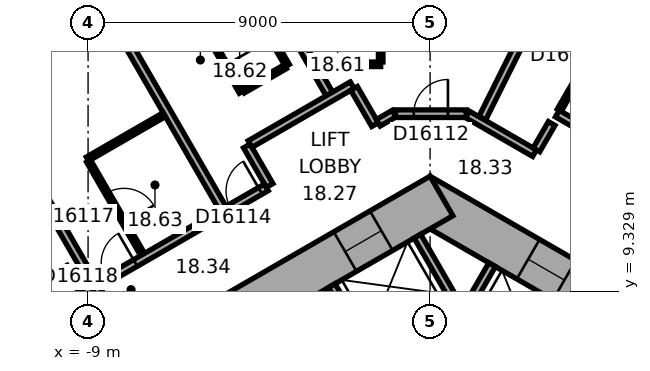
"""IFC4 building model, lengths in metres.
Left out: names, types, materials, properties, quantities, classifications, styles, units other than length and angle.
Written with IfcOpenShell. Run it as: python <this file> out.ifc"""

import sys

from ifc_helpers import new_model, si_unit, direction, frame, frame_2d, origin, place, context, subcontext, project, spatial, rectangle, extrude, element, fill, save


model = new_model("IFC4")
c1 = context("Model", 3, precision=1e-05, world=origin(), true_north=direction((0.0, 1.0)))
c2 = subcontext(c1, "Body", "Model", "MODEL_VIEW")
j1 = project(units=[si_unit("LENGTHUNIT", "METRE"), si_unit("PLANEANGLEUNIT", "RADIAN")], contexts=[c1])
p1 = place(None, origin())
s1 = spatial("IfcSite", under=j1, at=p1, CompositionType="ELEMENT")
p2 = place(p1, origin())
s2 = spatial("IfcBuilding", under=s1, at=p2, CompositionType="ELEMENT")
p3 = place(p2, frame((0.0, 0.0, 83.6)))
s3 = spatial("IfcBuildingStorey", under=s2, at=p3, CompositionType="ELEMENT", Elevation=83.6)
p4 = place(p3, frame((10.4, 5.658, 0.0), z_axis=(0.0, 0.0, 1.0), x_axis=(-0.866021384402, 0.500006961711, 0.0)))
e1 = element("IfcWall", 1, at=p4, inside=s3, PredefinedType="SHEAR", context=c2, shape_type="SweptSolid", body=[
    extrude(rectangle(XDim=12.355, YDim=1.2, at=frame_2d((6.178, 0.0))), origin(), (0.0, 0.0, 1.0), 3.3),
])
p5 = place(p4, frame((2.728, 0.0, 0.0)))
e2 = element("IfcOpeningElement", 2, at=p5, cuts=e1, PredefinedType="OPENING", context=c2, shape_type="SweptSolid", body=[
    extrude(rectangle(XDim=1.1, YDim=2.1, at=frame_2d((0.55, 1.05))), frame((0.0, 0.61, 0.0), z_axis=(0.0, -1.0, 0.0), x_axis=(1.0, 0.0, 0.0)), (0.0, 0.0, 1.0), 1.22),
])
p6 = place(p4, frame((5.328, 0.0, 0.0)))
e3 = element("IfcOpeningElement", 3, at=p6, cuts=e1, PredefinedType="OPENING", context=c2, shape_type="SweptSolid", body=[
    extrude(rectangle(XDim=1.1, YDim=2.1, at=frame_2d((0.55, 1.05))), frame((0.0, 0.61, 0.0), z_axis=(0.0, -1.0, 0.0), x_axis=(1.0, 0.0, 0.0)), (0.0, 0.0, 1.0), 1.22),
])
p7 = place(p4, frame((7.928, 0.0, 0.0)))
e4 = element("IfcOpeningElement", 4, at=p7, cuts=e1, PredefinedType="OPENING", context=c2, shape_type="SweptSolid", body=[
    extrude(rectangle(XDim=1.1, YDim=2.1, at=frame_2d((0.55, 1.05))), frame((0.0, 0.61, 0.0), z_axis=(0.0, -1.0, 0.0), x_axis=(1.0, 0.0, 0.0)), (0.0, 0.0, 1.0), 1.22),
])
p8 = place(p3, frame((0.3, 11.836, 0.0), z_axis=(0.0, 0.0, 1.0), x_axis=(-0.866021384402, -0.500006961711, 0.0)))
e5 = element("IfcWall", 5, at=p8, inside=s3, PredefinedType="SHEAR", context=c2, shape_type="SweptSolid", body=[
    extrude(rectangle(XDim=12.355, YDim=1.2, at=frame_2d((6.178, 0.0))), origin(), (0.0, 0.0, 1.0), 3.3),
])
p9 = place(p8, frame((6.378, 0.0, 0.0)))
e6 = element("IfcOpeningElement", 6, at=p9, cuts=e5, PredefinedType="OPENING", context=c2, shape_type="SweptSolid", body=[
    extrude(rectangle(XDim=1.5, YDim=2.1, at=frame_2d((0.75, 1.05))), frame((0.0, 0.61, 0.0), z_axis=(0.0, -1.0, 0.0), x_axis=(1.0, 0.0, 0.0)), (0.0, 0.0, 1.0), 1.22),
])
p10 = place(p8, frame((1.828, 0.0, 0.0)))
e7 = element("IfcOpeningElement", 7, at=p10, cuts=e5, PredefinedType="OPENING", context=c2, shape_type="SweptSolid", body=[
    extrude(rectangle(XDim=1.1, YDim=2.1, at=frame_2d((0.55, 1.05))), frame((0.0, 0.61, 0.0), z_axis=(0.0, -1.0, 0.0), x_axis=(1.0, 0.0, 0.0)), (0.0, 0.0, 1.0), 1.22),
])
p11 = place(p3, frame((20.63, 15.47, 0.0), z_axis=(0.0, 0.0, 1.0), x_axis=(-0.894934518609, 0.446197498203, 0.0)))
e8 = element("IfcWall", 8, at=p11, inside=s3, PredefinedType="STANDARD", context=c2, shape_type="SweptSolid", body=[
    extrude(rectangle(XDim=21.246, YDim=0.2, at=frame_2d((10.623, 0.0))), origin(), (0.0, 0.0, 1.0), 3.3),
])
p12 = place(p11, frame((1.553, 0.0, 0.8)))
e9 = element("IfcOpeningElement", 9, at=p12, cuts=e8, PredefinedType="OPENING", context=c2, shape_type="SweptSolid", body=[
    extrude(rectangle(XDim=2.4, YDim=1.7, at=frame_2d((1.2, 0.85))), frame((0.0, 0.11, 0.0), z_axis=(0.0, -1.0, 0.0), x_axis=(1.0, 0.0, 0.0)), (0.0, 0.0, 1.0), 0.22),
])
p13 = place(p11, frame((5.488, 0.0, 0.8)))
e10 = element("IfcOpeningElement", 10, at=p13, cuts=e8, PredefinedType="OPENING", context=c2, shape_type="SweptSolid", body=[
    extrude(rectangle(XDim=2.4, YDim=1.7, at=frame_2d((1.2, 0.85))), frame((0.0, 0.11, 0.0), z_axis=(0.0, -1.0, 0.0), x_axis=(1.0, 0.0, 0.0)), (0.0, 0.0, 1.0), 0.22),
])
p14 = place(p11, frame((9.422, 0.0, 0.8)))
e11 = element("IfcOpeningElement", 11, at=p14, cuts=e8, PredefinedType="OPENING", context=c2, shape_type="SweptSolid", body=[
    extrude(rectangle(XDim=2.4, YDim=1.7, at=frame_2d((1.2, 0.85))), frame((0.0, 0.11, 0.0), z_axis=(0.0, -1.0, 0.0), x_axis=(1.0, 0.0, 0.0)), (0.0, 0.0, 1.0), 0.22),
])
p15 = place(p11, frame((13.357, 0.0, 0.8)))
e12 = element("IfcOpeningElement", 12, at=p15, cuts=e8, PredefinedType="OPENING", context=c2, shape_type="SweptSolid", body=[
    extrude(rectangle(XDim=2.4, YDim=1.7, at=frame_2d((1.2, 0.85))), frame((0.0, 0.11, 0.0), z_axis=(0.0, -1.0, 0.0), x_axis=(1.0, 0.0, 0.0)), (0.0, 0.0, 1.0), 0.22),
])
p16 = place(p11, frame((17.292, 0.0, 0.8)))
e13 = element("IfcOpeningElement", 13, at=p16, cuts=e8, PredefinedType="OPENING", context=c2, shape_type="SweptSolid", body=[
    extrude(rectangle(XDim=2.4, YDim=1.7, at=frame_2d((1.2, 0.85))), frame((0.0, 0.11, 0.0), z_axis=(0.0, -1.0, 0.0), x_axis=(1.0, 0.0, 0.0)), (0.0, 0.0, 1.0), 0.22),
])
p17 = place(p3, frame((-3.136, 24.805, 0.0), z_axis=(0.0, 0.0, 1.0), x_axis=(-0.866028291626, -0.499994998079, 0.0)))
e14 = element("IfcWall", 14, at=p17, inside=s3, PredefinedType="STANDARD", context=c2, shape_type="SweptSolid", body=[
    extrude(rectangle(XDim=21.246, YDim=0.2, at=frame_2d((10.623, 0.0))), origin(), (0.0, 0.0, 1.0), 3.3),
])
p18 = place(p17, frame((1.555, 0.0, 0.8)))
e15 = element("IfcOpeningElement", 15, at=p18, cuts=e14, PredefinedType="OPENING", context=c2, shape_type="SweptSolid", body=[
    extrude(rectangle(XDim=2.4, YDim=1.7, at=frame_2d((1.2, 0.85))), frame((0.0, 0.11, 0.0), z_axis=(0.0, -1.0, 0.0), x_axis=(1.0, 0.0, 0.0)), (0.0, 0.0, 1.0), 0.22),
])
p19 = place(p17, frame((5.489, 0.0, 0.8)))
e16 = element("IfcOpeningElement", 16, at=p19, cuts=e14, PredefinedType="OPENING", context=c2, shape_type="SweptSolid", body=[
    extrude(rectangle(XDim=2.4, YDim=1.7, at=frame_2d((1.2, 0.85))), frame((0.0, 0.11, 0.0), z_axis=(0.0, -1.0, 0.0), x_axis=(1.0, 0.0, 0.0)), (0.0, 0.0, 1.0), 0.22),
])
p20 = place(p17, frame((9.424, 0.0, 0.8)))
e17 = element("IfcOpeningElement", 17, at=p20, cuts=e14, PredefinedType="OPENING", context=c2, shape_type="SweptSolid", body=[
    extrude(rectangle(XDim=2.4, YDim=1.7, at=frame_2d((1.2, 0.85))), frame((0.0, 0.11, 0.0), z_axis=(0.0, -1.0, 0.0), x_axis=(1.0, 0.0, 0.0)), (0.0, 0.0, 1.0), 0.22),
])
p21 = place(p17, frame((13.358, 0.0, 0.8)))
e18 = element("IfcOpeningElement", 18, at=p21, cuts=e14, PredefinedType="OPENING", context=c2, shape_type="SweptSolid", body=[
    extrude(rectangle(XDim=2.4, YDim=1.7, at=frame_2d((1.2, 0.85))), frame((0.0, 0.11, 0.0), z_axis=(0.0, -1.0, 0.0), x_axis=(1.0, 0.0, 0.0)), (0.0, 0.0, 1.0), 0.22),
])
p22 = place(p17, frame((17.293, 0.0, 0.8)))
e19 = element("IfcOpeningElement", 19, at=p22, cuts=e14, PredefinedType="OPENING", context=c2, shape_type="SweptSolid", body=[
    extrude(rectangle(XDim=2.4, YDim=1.7, at=frame_2d((1.2, 0.85))), frame((0.0, 0.11, 0.0), z_axis=(0.0, -1.0, 0.0), x_axis=(1.0, 0.0, 0.0)), (0.0, 0.0, 1.0), 0.22),
])
p23 = place(p3, frame((0.532, 8.122, 0.0), z_axis=(0.0, 0.0, 1.0), x_axis=(0.500077893725, 0.86598042715, 0.0)))
e20 = element("IfcWall", 20, at=p23, inside=s3, PredefinedType="PARTITIONING", context=c2, shape_type="SweptSolid", body=[
    extrude(rectangle(XDim=2.2, YDim=0.2, at=frame_2d((1.1, 0.0))), origin(), (0.0, 0.0, 1.0), 3.05),
])
p24 = place(p3, frame((0.767, 8.872, 0.0), z_axis=(0.0, 0.0, 1.0), x_axis=(-0.499994660107, 0.866028486751, 0.0)))
e21 = element("IfcWall", 21, at=p24, inside=s3, PredefinedType="PARTITIONING", context=c2, shape_type="SweptSolid", body=[
    extrude(rectangle(XDim=2.2, YDim=0.2, at=frame_2d((1.1, 0.0))), origin(), (0.0, 0.0, 1.0), 3.05),
])
p25 = place(p3, frame((-1.485, 7.572, 0.0), z_axis=(0.0, 0.0, 1.0), x_axis=(-0.50002983664, 0.866008176907, 0.0)))
e22 = element("IfcWall", 22, at=p25, inside=s3, PredefinedType="PARTITIONING", context=c2, shape_type="SweptSolid", body=[
    extrude(rectangle(XDim=2.2, YDim=0.2, at=frame_2d((1.1, 0.0))), origin(), (0.0, 0.0, 1.0), 3.05),
])
p26 = place(p3, frame((-10.083, 19.524, 0.0), z_axis=(0.0, 0.0, 1.0), x_axis=(0.499999662836, -0.866025598446, 0.0)))
e23 = element("IfcWall", 23, at=p26, inside=s3, PredefinedType="PARTITIONING", context=c2, shape_type="SweptSolid", body=[
    extrude(rectangle(XDim=9.25, YDim=0.2, at=frame_2d((4.625, 0.0))), origin(), (0.0, 0.0, 1.0), 2.6),
])
p27 = place(p3, frame((-9.016, 12.808, 0.0), z_axis=(0.0, 0.0, 1.0), x_axis=(0.86600796803, 0.500030198396, 0.0)))
e24 = element("IfcWall", 24, at=p27, inside=s3, PredefinedType="PARTITIONING", context=c2, shape_type="SweptSolid", body=[
    extrude(rectangle(XDim=2.335, YDim=0.12, at=frame_2d((1.167, 0.0))), origin(), (0.0, 0.0, 1.0), 3.05),
])
p28 = place(p3, frame((-8.902, 9.41, 0.0), z_axis=(0.0, 0.0, 1.0), x_axis=(-0.866014299198, -0.500019233215, 0.0)))
e25 = element("IfcWall", 25, at=p28, inside=s3, PredefinedType="PARTITIONING", context=c2, shape_type="SweptSolid", body=[
    extrude(rectangle(XDim=3.133, YDim=0.2, at=frame_2d((1.567, 0.0))), origin(), (0.0, 0.0, 1.0), 3.05),
])
p29 = place(p28, frame((0.225, 0.0, 0.0)))
e26 = element("IfcOpeningElement", 26, at=p29, cuts=e25, PredefinedType="OPENING", context=c2, shape_type="SweptSolid", body=[
    extrude(rectangle(XDim=0.9, YDim=2.1, at=frame_2d((0.45, 1.05))), frame((0.0, 0.11, 0.0), z_axis=(0.0, -1.0, 0.0), x_axis=(1.0, 0.0, 0.0)), (0.0, 0.0, 1.0), 0.22),
])
p30 = place(p3, frame((-7.865, 7.814, 0.0), z_axis=(0.0, 0.0, 1.0), x_axis=(-0.500004234368, 0.866022959057, 0.0)))
e27 = element("IfcWall", 27, at=p30, inside=s3, PredefinedType="PARTITIONING", context=c2, shape_type="SweptSolid", body=[
    extrude(rectangle(XDim=11.25, YDim=0.2, at=frame_2d((5.625, 0.0))), origin(), (0.0, 0.0, 1.0), 3.05),
])
p31 = place(p30, frame((0.5, 0.0, 0.0)))
e28 = element("IfcOpeningElement", 28, at=p31, cuts=e27, PredefinedType="OPENING", context=c2, shape_type="SweptSolid", body=[
    extrude(rectangle(XDim=0.9, YDim=2.1, at=frame_2d((0.45, 1.05))), frame((0.0, 0.11, 0.0), z_axis=(0.0, -1.0, 0.0), x_axis=(1.0, 0.0, 0.0)), (0.0, 0.0, 1.0), 0.22),
])
p32 = place(p3, frame((-7.566, 10.296, 0.0), z_axis=(0.0, 0.0, 1.0), x_axis=(-0.499985389037, 0.866033839264, 0.0)))
e29 = element("IfcWall", 29, at=p32, inside=s3, PredefinedType="PARTITIONING", context=c2, shape_type="SweptSolid", body=[
    extrude(rectangle(XDim=2.84, YDim=0.12, at=frame_2d((1.42, 0.0))), origin(), (0.0, 0.0, 1.0), 3.05),
])
p33 = place(p32, frame((0.97, 0.0, 0.0)))
e30 = element("IfcOpeningElement", 30, at=p33, cuts=e29, PredefinedType="OPENING", context=c2, shape_type="SweptSolid", body=[
    extrude(rectangle(XDim=0.9, YDim=2.1, at=frame_2d((0.45, 1.05))), frame((0.0, 0.07, 0.0), z_axis=(0.0, -1.0, 0.0), x_axis=(1.0, 0.0, 0.0)), (0.0, 0.0, 1.0), 0.14),
])
p34 = place(p3, frame((-6.676, 21.492, 0.0), z_axis=(0.0, 0.0, 1.0), x_axis=(0.500011263043, -0.866018900966, 0.0)))
e31 = element("IfcWall", 31, at=p34, inside=s3, PredefinedType="PARTITIONING", context=c2, shape_type="SweptSolid", body=[
    extrude(rectangle(XDim=8.049, YDim=0.2, at=frame_2d((4.024, 0.0))), origin(), (0.0, 0.0, 1.0), 3.05),
])
p35 = place(p3, frame((-5.026, 17.469, 0.0), z_axis=(0.0, 0.0, 1.0), x_axis=(0.500005339912, -0.866022320763, 0.0)))
e32 = element("IfcWall", 32, at=p35, inside=s3, PredefinedType="PARTITIONING", context=c2, shape_type="SweptSolid", body=[
    extrude(rectangle(XDim=2.54, YDim=0.12, at=frame_2d((1.27, 0.0))), origin(), (0.0, 0.0, 1.0), 3.05),
])
p36 = place(p3, frame((-4.968, 14.569, 0.0), z_axis=(0.0, 0.0, 1.0), x_axis=(-0.500046963369, 0.865998287773, 0.0)))
e33 = element("IfcWall", 33, at=p36, inside=s3, PredefinedType="PARTITIONING", context=c2, shape_type="SweptSolid", body=[
    extrude(rectangle(XDim=2.54, YDim=0.12, at=frame_2d((1.27, 0.0))), origin(), (0.0, 0.0, 1.0), 3.05),
])
p37 = place(p36, frame((0.82, 0.0, 0.0)))
e34 = element("IfcOpeningElement", 34, at=p37, cuts=e33, PredefinedType="OPENING", context=c2, shape_type="SweptSolid", body=[
    extrude(rectangle(XDim=0.9, YDim=2.1, at=frame_2d((0.45, 1.05))), frame((0.0, 0.07, 0.0), z_axis=(0.0, -1.0, 0.0), x_axis=(1.0, 0.0, 0.0)), (0.0, 0.0, 1.0), 0.14),
])
p38 = place(p3, frame((-4.823, 13.152, 0.0), z_axis=(0.0, 0.0, 1.0), x_axis=(0.499986357472, -0.866033280158, 0.0)))
e35 = element("IfcWall", 35, at=p38, inside=s3, PredefinedType="PARTITIONING", context=c2, shape_type="SweptSolid", body=[
    extrude(rectangle(XDim=1.201, YDim=0.2, at=frame_2d((0.601, 0.0))), origin(), (0.0, 0.0, 1.0), 3.05),
])
p39 = place(p3, frame((-4.309, 12.061, 0.0), z_axis=(0.0, 0.0, 1.0), x_axis=(-0.866020679205, -0.500008183122, 0.0)))
e36 = element("IfcWall", 36, at=p39, inside=s3, PredefinedType="PARTITIONING", context=c2, shape_type="SweptSolid", body=[
    extrude(rectangle(XDim=5.104, YDim=0.2, at=frame_2d((2.552, 0.0))), origin(), (0.0, 0.0, 1.0), 3.05),
])
p40 = place(p39, frame((0.185, 0.0, 0.0)))
e37 = element("IfcOpeningElement", 37, at=p40, cuts=e36, PredefinedType="OPENING", context=c2, shape_type="SweptSolid", body=[
    extrude(rectangle(XDim=0.9, YDim=2.1, at=frame_2d((0.45, 1.05))), frame((0.0, 0.11, 0.0), z_axis=(0.0, -1.0, 0.0), x_axis=(1.0, 0.0, 0.0)), (0.0, 0.0, 1.0), 0.22),
])
p41 = place(p39, frame((3.979, 0.0, 0.0)))
e38 = element("IfcOpeningElement", 38, at=p41, cuts=e36, PredefinedType="OPENING", context=c2, shape_type="SweptSolid", body=[
    extrude(rectangle(XDim=0.9, YDim=2.1, at=frame_2d((0.45, 1.05))), frame((0.0, 0.11, 0.0), z_axis=(0.0, -1.0, 0.0), x_axis=(1.0, 0.0, 0.0)), (0.0, 0.0, 1.0), 0.22),
])
p42 = place(p3, frame((-3.808, 15.239, 0.0), z_axis=(0.0, 0.0, 1.0), x_axis=(-0.866087136806, -0.499893060024, 0.0)))
e39 = element("IfcWall", 39, at=p42, inside=s3, PredefinedType="PARTITIONING", context=c2, shape_type="SweptSolid", body=[
    extrude(rectangle(XDim=1.28, YDim=0.12, at=frame_2d((0.64, 0.0))), origin(), (0.0, 0.0, 1.0), 3.05),
])
p43 = place(p3, frame((-2.05, 14.752, 0.0), z_axis=(0.0, 0.0, 1.0), x_axis=(-0.866030936828, -0.499990416364, 0.0)))
e40 = element("IfcWall", 40, at=p43, inside=s3, PredefinedType="PARTITIONING", context=c2, shape_type="SweptSolid", body=[
    extrude(rectangle(XDim=3.102, YDim=0.2, at=frame_2d((1.551, 0.0))), origin(), (0.0, 0.0, 1.0), 3.05),
])
p44 = place(p3, frame((-1.449, 13.712, 0.0), z_axis=(0.0, 0.0, 1.0), x_axis=(-0.499978356969, 0.866037899034, 0.0)))
e41 = element("IfcWall", 41, at=p44, inside=s3, PredefinedType="PARTITIONING", context=c2, shape_type="SweptSolid", body=[
    extrude(rectangle(XDim=1.101, YDim=0.2, at=frame_2d((0.551, 0.0))), origin(), (0.0, 0.0, 1.0), 3.05),
])
p45 = place(p3, frame((-1.3, 15.301, 0.0), z_axis=(0.0, 0.0, 1.0), x_axis=(-1.0, 0.0, 0.0)))
e42 = element("IfcWall", 42, at=p45, inside=s3, PredefinedType="PARTITIONING", context=c2, shape_type="SweptSolid", body=[
    extrude(rectangle(XDim=1.661, YDim=0.12, at=frame_2d((0.831, 0.0))), origin(), (0.0, 0.0, 1.0), 3.05),
])
p46 = place(p3, frame((-1.3, 18.341, 0.0), z_axis=(0.0, 0.0, 1.0), x_axis=(0.0, -1.0, 0.0)))
e43 = element("IfcWall", 43, at=p46, inside=s3, PredefinedType="PARTITIONING", context=c2, shape_type="SweptSolid", body=[
    extrude(rectangle(XDim=2.98, YDim=0.12, at=frame_2d((1.49, 0.0))), origin(), (0.0, 0.0, 1.0), 3.05),
])
p47 = place(p46, frame((1.04, 0.0, 0.0)))
e44 = element("IfcOpeningElement", 44, at=p47, cuts=e43, PredefinedType="OPENING", context=c2, shape_type="SweptSolid", body=[
    extrude(rectangle(XDim=0.9, YDim=2.1, at=frame_2d((0.45, 1.05))), frame((0.0, 0.07, 0.0), z_axis=(0.0, -1.0, 0.0), x_axis=(1.0, 0.0, 0.0)), (0.0, 0.0, 1.0), 0.14),
])
p48 = place(p3, frame((-0.95, 14.001, 0.0), z_axis=(0.0, 0.0, 1.0), x_axis=(-0.86609177584, -0.499885022602, 0.0)))
e45 = element("IfcWall", 45, at=p48, inside=s3, PredefinedType="PARTITIONING", context=c2, shape_type="SweptSolid", body=[
    extrude(rectangle(XDim=0.477, YDim=0.2, at=frame_2d((0.238, 0.0))), origin(), (0.0, 0.0, 1.0), 3.05),
])
p49 = place(p3, frame((0.95, 14.001, 0.0), z_axis=(0.0, 0.0, 1.0), x_axis=(-1.0, 0.0, 0.0)))
e46 = element("IfcWall", 46, at=p49, inside=s3, PredefinedType="PARTITIONING", context=c2, shape_type="SweptSolid", body=[
    extrude(rectangle(XDim=1.86, YDim=0.2, at=frame_2d((0.93, 0.0))), origin(), (0.0, 0.0, 1.0), 3.05),
])
p50 = place(p49, frame((0.48, 0.0, 0.0)))
e47 = element("IfcOpeningElement", 47, at=p50, cuts=e46, PredefinedType="OPENING", context=c2, shape_type="SweptSolid", body=[
    extrude(rectangle(XDim=0.9, YDim=2.1, at=frame_2d((0.45, 1.05))), frame((0.0, 0.11, 0.0), z_axis=(0.0, -1.0, 0.0), x_axis=(1.0, 0.0, 0.0)), (0.0, 0.0, 1.0), 0.22),
])
p51 = place(p3, frame((2.748, 12.962, 0.0), z_axis=(0.0, 0.0, 1.0), x_axis=(-0.866013897511, 0.50001992892, 0.0)))
e48 = element("IfcWall", 48, at=p51, inside=s3, PredefinedType="PARTITIONING", context=c2, shape_type="SweptSolid", body=[
    extrude(rectangle(XDim=2.037, YDim=0.2, at=frame_2d((1.018, 0.0))), origin(), (0.0, 0.0, 1.0), 3.05),
])
p52 = place(p3, frame((3.199, 13.743, 0.0), z_axis=(0.0, 0.0, 1.0), x_axis=(-0.500170954823, -0.865926680471, 0.0)))
e49 = element("IfcWall", 49, at=p52, inside=s3, PredefinedType="PARTITIONING", context=c2, shape_type="SweptSolid", body=[
    extrude(rectangle(XDim=0.801, YDim=0.2, at=frame_2d((0.4, 0.0))), origin(), (0.0, 0.0, 1.0), 3.05),
])
p53 = place(p3, frame((3.399, 14.089, 0.0), z_axis=(0.0, 0.0, 1.0), x_axis=(0.4999416173, 0.866059108428, 0.0)))
e50 = element("IfcWall", 50, at=p53, inside=s3, PredefinedType="PARTITIONING", context=c2, shape_type="SweptSolid", body=[
    extrude(rectangle(XDim=2.7, YDim=0.12, at=frame_2d((1.35, 0.0))), origin(), (0.0, 0.0, 1.0), 3.05),
])
p54 = place(p53, frame((0.9, 0.0, 0.0)))
e51 = element("IfcOpeningElement", 51, at=p54, cuts=e50, PredefinedType="OPENING", context=c2, shape_type="SweptSolid", body=[
    extrude(rectangle(XDim=0.9, YDim=2.1, at=frame_2d((0.45, 1.05))), frame((0.0, 0.07, 0.0), z_axis=(0.0, -1.0, 0.0), x_axis=(1.0, 0.0, 0.0)), (0.0, 0.0, 1.0), 0.14),
])
p55 = place(p3, frame((5.351, 21.859, 0.0), z_axis=(0.0, 0.0, 1.0), x_axis=(-0.446205309328, -0.894930624086, 0.0)))
e52 = element("IfcWall", 52, at=p55, inside=s3, PredefinedType="PARTITIONING", context=c2, shape_type="SweptSolid", body=[
    extrude(rectangle(XDim=8.913, YDim=0.2, at=frame_2d((4.457, 0.0))), origin(), (0.0, 0.0, 1.0), 2.6),
])
p56 = place(p3, frame((10.885, 9.652, 0.0), z_axis=(0.0, 0.0, 1.0), x_axis=(-0.866033277307, 0.499986362411, 0.0)))
e53 = element("IfcWall", 53, at=p56, inside=s3, PredefinedType="PARTITIONING", context=c2, shape_type="SweptSolid", body=[
    extrude(rectangle(XDim=8.702, YDim=0.2, at=frame_2d((4.351, 0.0))), origin(), (0.0, 0.0, 1.0), 3.05),
])
p57 = place(p56, frame((3.844, 0.0, 0.0)))
e54 = element("IfcOpeningElement", 54, at=p57, cuts=e53, PredefinedType="OPENING", context=c2, shape_type="SweptSolid", body=[
    extrude(rectangle(XDim=0.9, YDim=2.1, at=frame_2d((0.45, 1.05))), frame((0.0, 0.11, 0.0), z_axis=(0.0, -1.0, 0.0), x_axis=(1.0, 0.0, 0.0)), (0.0, 0.0, 1.0), 0.22),
])
p58 = place(p7, origin())
e55 = element("IfcDoor", 55, at=p58, inside=s3, OperationType="DOUBLE_DOOR_SLIDING", PredefinedType="DOOR", context=c2, shape_type="SweptSolid", body=[
    extrude(rectangle(XDim=1.1, YDim=2.1, at=frame_2d((0.55, 1.05))), frame((0.0, 0.025, 0.0), z_axis=(0.0, -1.0, 0.0), x_axis=(1.0, 0.0, 0.0)), (0.0, 0.0, 1.0), 0.05),
])
fill(e4, e55)
p59 = place(p10, origin())
e56 = element("IfcDoor", 56, at=p59, inside=s3, OperationType="DOUBLE_DOOR_SLIDING", PredefinedType="DOOR", context=c2, shape_type="SweptSolid", body=[
    extrude(rectangle(XDim=1.1, YDim=2.1, at=frame_2d((0.55, 1.05))), frame((0.0, 0.025, 0.0), z_axis=(0.0, -1.0, 0.0), x_axis=(1.0, 0.0, 0.0)), (0.0, 0.0, 1.0), 0.05),
])
fill(e7, e56)
p60 = place(p50, origin())
e57 = element("IfcDoor", 57, at=p60, inside=s3, OperationType="SINGLE_SWING_LEFT", PredefinedType="DOOR", context=c2, shape_type="SweptSolid", body=[
    extrude(rectangle(XDim=0.9, YDim=2.1, at=frame_2d((0.45, 1.05))), frame((0.0, 0.025, 0.0), z_axis=(0.0, -1.0, 0.0), x_axis=(1.0, 0.0, 0.0)), (0.0, 0.0, 1.0), 0.05),
])
fill(e47, e57)
p61 = place(p40, origin())
e58 = element("IfcDoor", 58, at=p61, inside=s3, OperationType="SINGLE_SWING_LEFT", PredefinedType="DOOR", context=c2, shape_type="SweptSolid", body=[
    extrude(rectangle(XDim=0.9, YDim=2.1, at=frame_2d((0.45, 1.05))), frame((0.0, 0.025, 0.0), z_axis=(0.0, -1.0, 0.0), x_axis=(1.0, 0.0, 0.0)), (0.0, 0.0, 1.0), 0.05),
])
fill(e37, e58)
p62 = place(p37, origin())
e59 = element("IfcDoor", 59, at=p62, inside=s3, OperationType="SINGLE_SWING_LEFT", PredefinedType="DOOR", context=c2, shape_type="SweptSolid", body=[
    extrude(rectangle(XDim=0.9, YDim=2.1, at=frame_2d((0.45, 1.05))), frame((0.0, 0.025, 0.0), z_axis=(0.0, -1.0, 0.0), x_axis=(1.0, 0.0, 0.0)), (0.0, 0.0, 1.0), 0.05),
])
fill(e34, e59)
p63 = place(p41, origin())
e60 = element("IfcDoor", 60, at=p63, inside=s3, OperationType="SINGLE_SWING_LEFT", PredefinedType="DOOR", context=c2, shape_type="SweptSolid", body=[
    extrude(rectangle(XDim=0.9, YDim=2.1, at=frame_2d((0.45, 1.05))), frame((0.0, 0.025, 0.0), z_axis=(0.0, -1.0, 0.0), x_axis=(1.0, 0.0, 0.0)), (0.0, 0.0, 1.0), 0.05),
])
fill(e38, e60)
p64 = place(p33, origin())
e61 = element("IfcDoor", 61, at=p64, inside=s3, OperationType="SINGLE_SWING_LEFT", PredefinedType="DOOR", context=c2, shape_type="SweptSolid", body=[
    extrude(rectangle(XDim=0.9, YDim=2.1, at=frame_2d((0.45, 1.05))), frame((0.0, 0.025, 0.0), z_axis=(0.0, -1.0, 0.0), x_axis=(1.0, 0.0, 0.0)), (0.0, 0.0, 1.0), 0.05),
])
fill(e30, e61)
save(model, sys.argv[1])
